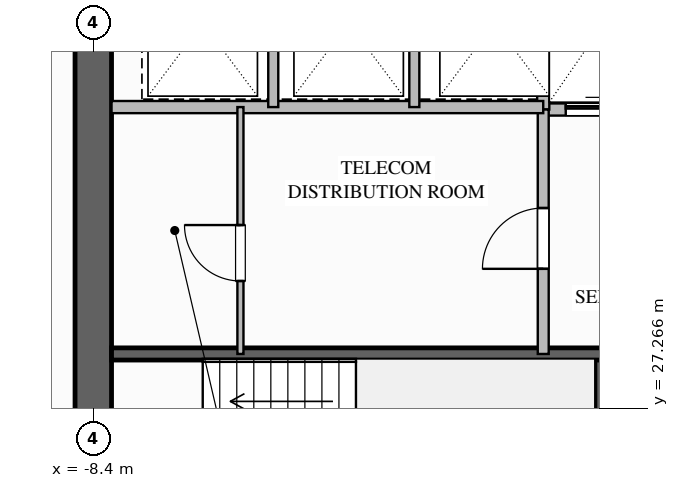
"""IFC4 building model, lengths in metres.
Left out: names, types, materials, properties, quantities, classifications, styles, units other than length and angle.
Written with IfcOpenShell. Run it as: python <this file> out.ifc"""

import sys

from ifc_helpers import new_model, si_unit, direction, frame, frame_2d, origin, place, context, subcontext, project, spatial, rectangle, extrude, element, fill, save


model = new_model("IFC4")
c1 = context("Model", 3, precision=1e-05, world=origin(), true_north=direction((0.0, 1.0)))
c2 = subcontext(c1, "Body", "Model", "MODEL_VIEW")
j1 = project(units=[si_unit("LENGTHUNIT", "METRE"), si_unit("PLANEANGLEUNIT", "RADIAN")], contexts=[c1])
p1 = place(None, origin())
s1 = spatial("IfcSite", under=j1, at=p1, CompositionType="ELEMENT")
p2 = place(p1, origin())
s2 = spatial("IfcBuilding", under=s1, at=p2, CompositionType="ELEMENT")
p3 = place(p2, frame((0.0, 0.0, 33.2)))
s3 = spatial("IfcBuildingStorey", under=s2, at=p3, CompositionType="ELEMENT", Elevation=33.2)
p4 = place(p3, frame((-8.4, 18.9, 0.0), z_axis=(0.0, 0.0, 1.0), x_axis=(0.0, 1.0, 0.0)))
e1 = element("IfcWall", 1, at=p4, inside=s3, PredefinedType="SHEAR", context=c2, shape_type="SweptSolid", body=[
    extrude(rectangle(XDim=16.2, YDim=0.6, at=frame_2d((8.1, 0.0))), origin(), (0.0, 0.0, 1.0), 3.5),
])
p5 = place(p4, frame((3.9, 0.0, 0.0)))
e2 = element("IfcOpeningElement", 2, at=p5, cuts=e1, PredefinedType="OPENING", context=c2, shape_type="SweptSolid", body=[
    extrude(rectangle(XDim=1.08, YDim=2.04, at=frame_2d((0.54, 1.02))), frame((0.0, 0.31, 0.0), z_axis=(0.0, -1.0, 0.0), x_axis=(1.0, 0.0, 0.0)), (0.0, 0.0, 1.0), 0.62),
])
p6 = place(p3, frame((0.0, 25.04, 0.0), z_axis=(0.0, 0.0, 1.0), x_axis=(0.0, 1.0, 0.0)))
e3 = element("IfcWall", 3, at=p6, inside=s3, PredefinedType="SOLIDWALL", context=c2, shape_type="SweptSolid", body=[
    extrude(rectangle(XDim=3.12, YDim=0.3, at=frame_2d((1.56, 0.0))), origin(), (0.0, 0.0, 1.0), 3.24),
])
p7 = place(p3, frame((-8.1, 28.16, 0.0), z_axis=(0.0, 0.0, 1.0), x_axis=(1.0, 0.0, 0.0)))
e4 = element("IfcWall", 4, at=p7, inside=s3, PredefinedType="SOLIDWALL", context=c2, shape_type="SweptSolid", body=[
    extrude(rectangle(XDim=8.1, YDim=0.2, at=frame_2d((4.05, 0.0))), origin(), (0.0, 0.0, 1.0), 3.24),
])
p8 = place(p3, frame((-1.0, 32.18, 0.0), z_axis=(0.0, 0.0, 1.0), x_axis=(1.0, 0.0, 0.0)))
e5 = element("IfcWall", 5, at=p8, inside=s3, PredefinedType="SOLIDWALL", context=c2, shape_type="SweptSolid", body=[
    extrude(rectangle(XDim=4.1, YDim=0.2, at=frame_2d((2.05, 0.0))), origin(), (0.0, 0.0, 1.0), 3.24),
])
p9 = place(p8, frame((0.37, 0.0, 0.0)))
e6 = element("IfcOpeningElement", 6, at=p9, cuts=e5, PredefinedType="OPENING", context=c2, shape_type="SweptSolid", body=[
    extrude(rectangle(XDim=1.3, YDim=2.2, at=frame_2d((0.65, 1.1))), frame((0.0, 0.11, 0.0), z_axis=(0.0, -1.0, 0.0), x_axis=(1.0, 0.0, 0.0)), (0.0, 0.0, 1.0), 0.22),
])
p10 = place(p8, frame((2.33, 0.0, 0.0)))
e7 = element("IfcOpeningElement", 7, at=p10, cuts=e5, PredefinedType="OPENING", context=c2, shape_type="SweptSolid", body=[
    extrude(rectangle(XDim=1.3, YDim=2.2, at=frame_2d((0.65, 1.1))), frame((0.0, 0.11, 0.0), z_axis=(0.0, -1.0, 0.0), x_axis=(1.0, 0.0, 0.0)), (0.0, 0.0, 1.0), 0.22),
])
p11 = place(p3, frame((-1.0, 32.18, 0.0), z_axis=(0.0, 0.0, 1.0), x_axis=(0.0, 1.0, 0.0)))
e8 = element("IfcWall", 8, at=p11, inside=s3, PredefinedType="SOLIDWALL", context=c2, shape_type="SweptSolid", body=[
    extrude(rectangle(XDim=2.92, YDim=0.2, at=frame_2d((1.46, 0.0))), origin(), (0.0, 0.0, 1.0), 3.24),
])
p12 = place(p3, frame((-1.0, 28.16, 0.0), z_axis=(0.0, 0.0, 1.0), x_axis=(0.0, 1.0, 0.0)))
e9 = element("IfcWall", 9, at=p12, inside=s3, PredefinedType="SOLIDWALL", context=c2, shape_type="SweptSolid", body=[
    extrude(rectangle(XDim=4.02, YDim=0.18, at=frame_2d((2.01, 0.0))), origin(), (0.0, 0.0, 1.0), 3.24),
])
p13 = place(p12, frame((1.4, 0.0, 0.0)))
e10 = element("IfcOpeningElement", 10, at=p13, cuts=e9, PredefinedType="OPENING", context=c2, shape_type="SweptSolid", body=[
    extrude(rectangle(XDim=1.0, YDim=2.1, at=frame_2d((0.5, 1.05))), frame((0.0, 0.1, 0.0), z_axis=(0.0, -1.0, 0.0), x_axis=(1.0, 0.0, 0.0)), (0.0, 0.0, 1.0), 0.2),
])
p14 = place(p3, frame((-8.1, 32.22, 0.0), z_axis=(0.0, 0.0, 1.0), x_axis=(1.0, 0.0, 0.0)))
e11 = element("IfcWall", 11, at=p14, inside=s3, PredefinedType="SOLIDWALL", context=c2, shape_type="SweptSolid", body=[
    extrude(rectangle(XDim=7.1, YDim=0.2, at=frame_2d((3.55, 0.0))), origin(), (0.0, 0.0, 1.0), 3.24),
])
for number, where, z_axis, x_axis in (
    (12, (-5.44, 32.22, 0.0), (0.0, 0.0, 1.0), (0.0, 1.0, 0.0)),
    (13, (-3.12, 32.22, 0.0), (0.0, 0.0, 1.0), (0.0, 1.0, 0.0)),
):
    element("IfcWall", number, at=place(p3, frame(where, z_axis=z_axis, x_axis=x_axis)), inside=s3, PredefinedType="PARTITIONING", context=c2, shape_type="SweptSolid", body=[
        extrude(rectangle(XDim=2.88, YDim=0.165, at=frame_2d((1.44, 0.0))), origin(), (0.0, 0.0, 1.0), 3.24),
    ])
p15 = place(p3, frame((-5.98, 28.16, 0.0), z_axis=(0.0, 0.0, 1.0), x_axis=(0.0, 1.0, 0.0)))
e14 = element("IfcWall", 14, at=p15, inside=s3, PredefinedType="PARTITIONING", context=c2, shape_type="SweptSolid", body=[
    extrude(rectangle(XDim=4.06, YDim=0.1, at=frame_2d((2.03, 0.0))), origin(), (0.0, 0.0, 1.0), 3.24),
])
p16 = place(p15, frame((1.2, 0.0, 0.0)))
e15 = element("IfcOpeningElement", 15, at=p16, cuts=e14, PredefinedType="OPENING", context=c2, shape_type="SweptSolid", body=[
    extrude(rectangle(XDim=0.92, YDim=2.1, at=frame_2d((0.46, 1.05))), frame((0.0, 0.06, 0.0), z_axis=(0.0, -1.0, 0.0), x_axis=(1.0, 0.0, 0.0)), (0.0, 0.0, 1.0), 0.12),
])
p17 = place(p9, origin())
e16 = element("IfcDoor", 16, at=p17, inside=s3, OperationType="SLIDING_TO_LEFT", PredefinedType="DOOR", context=c2, shape_type="SweptSolid", body=[
    extrude(rectangle(XDim=1.3, YDim=2.2, at=frame_2d((0.65, 1.1))), frame((0.0, 0.025, 0.0), z_axis=(0.0, -1.0, 0.0), x_axis=(1.0, 0.0, 0.0)), (0.0, 0.0, 1.0), 0.05),
])
fill(e6, e16)
p18 = place(p13, origin())
e17 = element("IfcDoor", 17, at=p18, inside=s3, OperationType="SINGLE_SWING_LEFT", PredefinedType="DOOR", context=c2, shape_type="SweptSolid", body=[
    extrude(rectangle(XDim=1.0, YDim=2.1, at=frame_2d((0.5, 1.05))), frame((0.0, 0.025, 0.0), z_axis=(0.0, -1.0, 0.0), x_axis=(1.0, 0.0, 0.0)), (0.0, 0.0, 1.0), 0.05),
])
fill(e10, e17)
p19 = place(p16, origin())
e18 = element("IfcDoor", 18, at=p19, inside=s3, OperationType="SINGLE_SWING_RIGHT", PredefinedType="DOOR", context=c2, shape_type="SweptSolid", body=[
    extrude(rectangle(XDim=0.92, YDim=2.1, at=frame_2d((0.46, 1.05))), frame((0.0, 0.025, 0.0), z_axis=(0.0, -1.0, 0.0), x_axis=(1.0, 0.0, 0.0)), (0.0, 0.0, 1.0), 0.05),
])
fill(e15, e18)
save(model, sys.argv[1])
